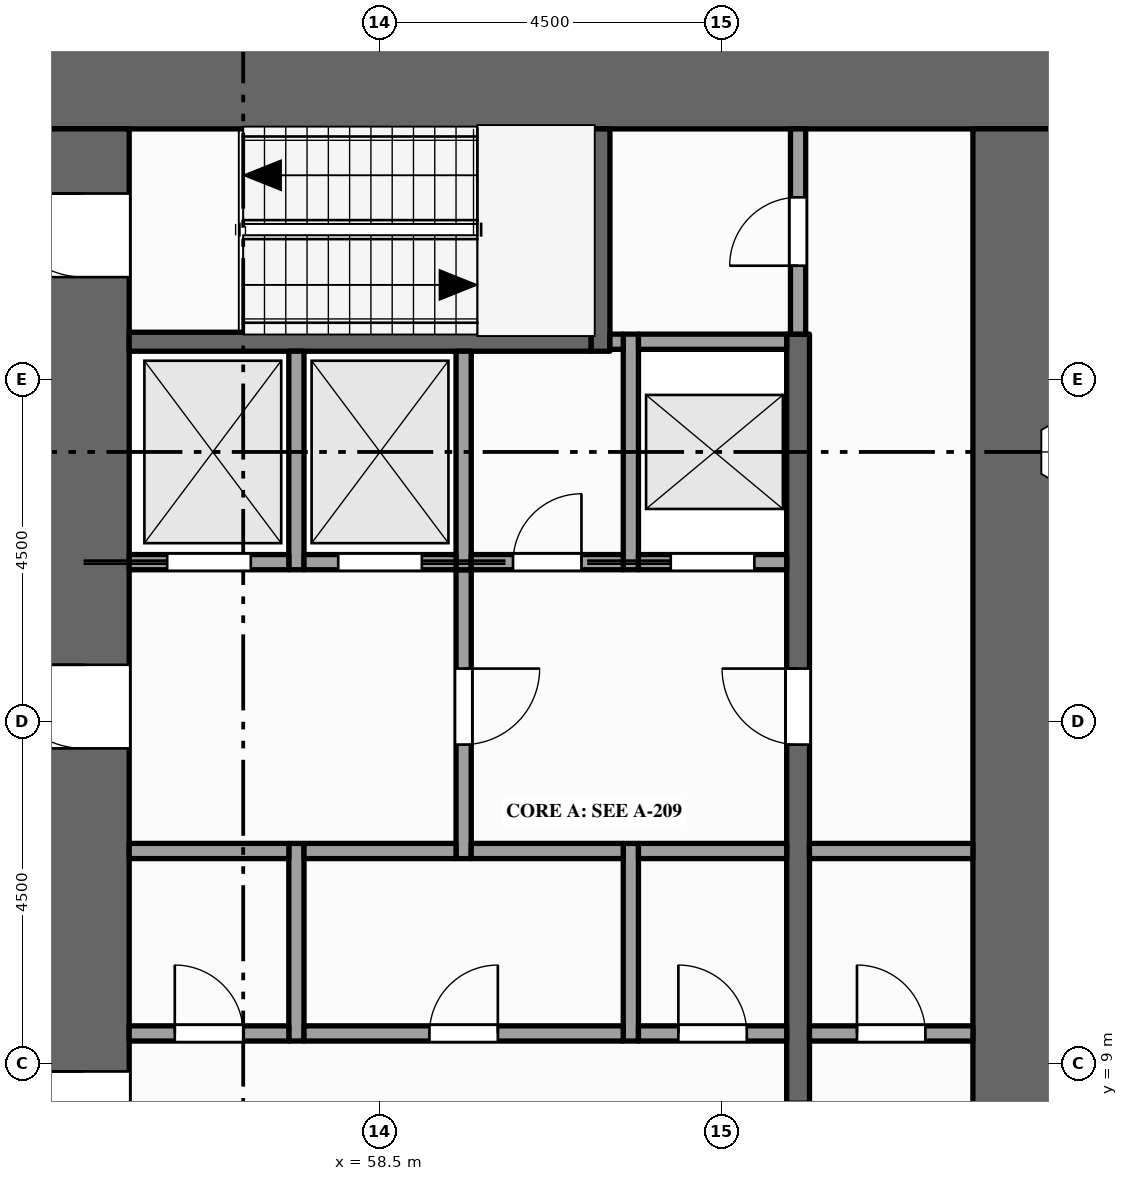
"""IFC4 building model, lengths in metres.
Left out: names, types, materials, properties, quantities, classifications, styles, units other than length and angle.
Written with IfcOpenShell. Run it as: python <this file> out.ifc"""

import sys

from ifc_helpers import new_model, si_unit, direction, frame, frame_2d, origin, place, context, subcontext, project, spatial, rectangle, extrude, element, fill, save


model = new_model("IFC4")
c1 = context("Model", 3, precision=1e-05, world=origin(), true_north=direction((0.0, 1.0)))
c2 = subcontext(c1, "Body", "Model", "MODEL_VIEW")
j1 = project(units=[si_unit("LENGTHUNIT", "METRE"), si_unit("PLANEANGLEUNIT", "RADIAN")], contexts=[c1])
p1 = place(None, origin())
s1 = spatial("IfcSite", under=j1, at=p1, CompositionType="ELEMENT")
p2 = place(p1, origin())
s2 = spatial("IfcBuilding", under=s1, at=p2, CompositionType="ELEMENT")
p3 = place(p2, frame((0.0, 0.0, 45.0)))
s3 = spatial("IfcBuildingStorey", under=s2, at=p3, CompositionType="ELEMENT", Elevation=45.0)
p4 = place(p3, frame((54.0, 21.9, -0.15), z_axis=(0.0, 0.0, 1.0), x_axis=(1.0, 0.0, 0.0)))
e1 = element("IfcWall", 1, at=p4, inside=s3, PredefinedType="SHEAR", context=c2, shape_type="SweptSolid", body=[
    extrude(rectangle(XDim=13.5, YDim=1.2, at=frame_2d((6.75, 0.0))), origin(), (0.0, 0.0, 1.0), 4.0),
])
p5 = place(p3, frame((54.6, 1.2, -0.15), z_axis=(0.0, 0.0, 1.0), x_axis=(0.0, 1.0, 0.0)))
e2 = element("IfcWall", 2, at=p5, inside=s3, PredefinedType="SHEAR", context=c2, shape_type="SweptSolid", body=[
    extrude(rectangle(XDim=20.1, YDim=1.2, at=frame_2d((10.05, 0.0))), origin(), (0.0, 0.0, 1.0), 4.0),
])
p6 = place(p5, frame((5.9, 0.0, 0.15)))
e3 = element("IfcOpeningElement", 3, at=p6, cuts=e2, PredefinedType="OPENING", context=c2, shape_type="SweptSolid", body=[
    extrude(rectangle(XDim=1.8, YDim=2.1, at=frame_2d((0.9, 1.05))), frame((0.0, 0.61, 0.0), z_axis=(0.0, -1.0, 0.0), x_axis=(1.0, 0.0, 0.0)), (0.0, 0.0, 1.0), 1.22),
])
p7 = place(p5, frame((11.95, 0.0, 0.15)))
e4 = element("IfcOpeningElement", 4, at=p7, cuts=e2, PredefinedType="OPENING", context=c2, shape_type="SweptSolid", body=[
    extrude(rectangle(XDim=1.1, YDim=2.1, at=frame_2d((0.55, 1.05))), frame((0.0, 0.61, 0.0), z_axis=(0.0, -1.0, 0.0), x_axis=(1.0, 0.0, 0.0)), (0.0, 0.0, 1.0), 1.22),
])
p8 = place(p5, frame((0.95, 0.0, 0.15)))
e5 = element("IfcOpeningElement", 5, at=p8, cuts=e2, PredefinedType="OPENING", context=c2, shape_type="SweptSolid", body=[
    extrude(rectangle(XDim=1.1, YDim=2.1, at=frame_2d((0.55, 1.05))), frame((0.0, 0.61, 0.0), z_axis=(0.0, -1.0, 0.0), x_axis=(1.0, 0.0, 0.0)), (0.0, 0.0, 1.0), 1.22),
])
p9 = place(p5, frame((18.15, 0.0, 0.15)))
e6 = element("IfcOpeningElement", 6, at=p9, cuts=e2, PredefinedType="OPENING", context=c2, shape_type="SweptSolid", body=[
    extrude(rectangle(XDim=1.1, YDim=2.1, at=frame_2d((0.55, 1.05))), frame((0.0, 0.61, 0.0), z_axis=(0.0, -1.0, 0.0), x_axis=(1.0, 0.0, 0.0)), (0.0, 0.0, 1.0), 1.22),
])
p10 = place(p3, frame((66.9, 1.2, -0.15), z_axis=(0.0, 0.0, 1.0), x_axis=(0.0, 1.0, 0.0)))
e7 = element("IfcWall", 7, at=p10, inside=s3, PredefinedType="SHEAR", context=c2, shape_type="SweptSolid", body=[
    extrude(rectangle(XDim=20.1, YDim=1.2, at=frame_2d((10.05, 0.0))), origin(), (0.0, 0.0, 1.0), 4.0),
])
p11 = place(p3, frame((57.4, 9.3, 0.0), z_axis=(0.0, 0.0, 1.0), x_axis=(0.0, 1.0, 0.0)))
e8 = element("IfcWall", 8, at=p11, inside=s3, PredefinedType="PARTITIONING", context=c2, shape_type="SweptSolid", body=[
    extrude(rectangle(XDim=2.6, YDim=0.2, at=frame_2d((1.3, 0.0))), origin(), (0.0, 0.0, 1.0), 3.85),
])
p12 = place(p3, frame((57.4, 15.5, 0.0), z_axis=(0.0, 0.0, 1.0), x_axis=(0.0, 1.0, 0.0)))
e9 = element("IfcWall", 9, at=p12, inside=s3, PredefinedType="SOLIDWALL", context=c2, shape_type="SweptSolid", body=[
    extrude(rectangle(XDim=2.875, YDim=0.2, at=frame_2d((1.438, 0.0))), origin(), (0.0, 0.0, 1.0), 3.85),
])
p13 = place(p3, frame((59.6, 11.7, 0.0), z_axis=(0.0, 0.0, 1.0), x_axis=(0.0, 1.0, 0.0)))
e10 = element("IfcWall", 10, at=p13, inside=s3, PredefinedType="PARTITIONING", context=c2, shape_type="SweptSolid", body=[
    extrude(rectangle(XDim=3.8, YDim=0.2, at=frame_2d((1.9, 0.0))), origin(), (0.0, 0.0, 1.0), 3.85),
])
p14 = place(p13, frame((1.5, 0.0, 0.0)))
e11 = element("IfcOpeningElement", 11, at=p14, cuts=e10, PredefinedType="OPENING", context=c2, shape_type="SweptSolid", body=[
    extrude(rectangle(XDim=1.0, YDim=2.1, at=frame_2d((0.5, 1.05))), frame((0.0, 0.11, 0.0), z_axis=(0.0, -1.0, 0.0), x_axis=(1.0, 0.0, 0.0)), (0.0, 0.0, 1.0), 0.22),
])
p15 = place(p3, frame((59.6, 15.5, 0.0), z_axis=(0.0, 0.0, 1.0), x_axis=(0.0, 1.0, 0.0)))
e12 = element("IfcWall", 12, at=p15, inside=s3, PredefinedType="SOLIDWALL", context=c2, shape_type="SweptSolid", body=[
    extrude(rectangle(XDim=2.875, YDim=0.2, at=frame_2d((1.438, 0.0))), origin(), (0.0, 0.0, 1.0), 3.85),
])
p16 = place(p3, frame((61.4, 18.375, 0.0), z_axis=(0.0, 0.0, 1.0), x_axis=(0.0, 1.0, 0.0)))
e13 = element("IfcWall", 13, at=p16, inside=s3, PredefinedType="SHEAR", context=c2, shape_type="SweptSolid", body=[
    extrude(rectangle(XDim=2.925, YDim=0.25, at=frame_2d((1.462, 0.0))), origin(), (0.0, 0.0, 1.0), 3.85),
])
p17 = place(p3, frame((61.8, 9.3, 0.0), z_axis=(0.0, 0.0, 1.0), x_axis=(0.0, 1.0, 0.0)))
e14 = element("IfcWall", 14, at=p17, inside=s3, PredefinedType="PARTITIONING", context=c2, shape_type="SweptSolid", body=[
    extrude(rectangle(XDim=2.6, YDim=0.2, at=frame_2d((1.3, 0.0))), origin(), (0.0, 0.0, 1.0), 3.85),
])
p18 = place(p3, frame((61.8, 15.5, 0.0), z_axis=(0.0, 0.0, 1.0), x_axis=(0.0, 1.0, 0.0)))
e15 = element("IfcWall", 15, at=p18, inside=s3, PredefinedType="SOLIDWALL", context=c2, shape_type="SweptSolid", body=[
    extrude(rectangle(XDim=3.1, YDim=0.2, at=frame_2d((1.55, 0.0))), origin(), (0.0, 0.0, 1.0), 3.85),
])
p19 = place(p3, frame((64.0, 4.1, 0.0), z_axis=(0.0, 0.0, 1.0), x_axis=(0.0, 1.0, 0.0)))
e16 = element("IfcWall", 16, at=p19, inside=s3, PredefinedType="SHEAR", context=c2, shape_type="SweptSolid", body=[
    extrude(rectangle(XDim=14.5, YDim=0.3, at=frame_2d((7.25, 0.0))), origin(), (0.0, 0.0, 1.0), 3.85),
])
p20 = place(p19, frame((3.4, 0.0, 0.0)))
e17 = element("IfcOpeningElement", 17, at=p20, cuts=e16, PredefinedType="OPENING", context=c2, shape_type="SweptSolid", body=[
    extrude(rectangle(XDim=1.0, YDim=2.1, at=frame_2d((0.5, 1.05))), frame((0.0, 0.16, 0.0), z_axis=(0.0, -1.0, 0.0), x_axis=(1.0, 0.0, 0.0)), (0.0, 0.0, 1.0), 0.32),
])
p21 = place(p19, frame((9.1, 0.0, 0.0)))
e18 = element("IfcOpeningElement", 18, at=p21, cuts=e16, PredefinedType="OPENING", context=c2, shape_type="SweptSolid", body=[
    extrude(rectangle(XDim=1.0, YDim=2.1, at=frame_2d((0.5, 1.05))), frame((0.0, 0.16, 0.0), z_axis=(0.0, -1.0, 0.0), x_axis=(1.0, 0.0, 0.0)), (0.0, 0.0, 1.0), 0.32),
])
p22 = place(p3, frame((64.0, 18.6, 0.0), z_axis=(0.0, 0.0, 1.0), x_axis=(0.0, 1.0, 0.0)))
e19 = element("IfcWall", 19, at=p22, inside=s3, PredefinedType="PARTITIONING", context=c2, shape_type="SweptSolid", body=[
    extrude(rectangle(XDim=2.7, YDim=0.2, at=frame_2d((1.35, 0.0))), origin(), (0.0, 0.0, 1.0), 3.85),
])
p23 = place(p22, frame((0.9, 0.0, 0.0)))
e20 = element("IfcOpeningElement", 20, at=p23, cuts=e19, PredefinedType="OPENING", context=c2, shape_type="SweptSolid", body=[
    extrude(rectangle(XDim=0.9, YDim=2.1, at=frame_2d((0.45, 1.05))), frame((0.0, 0.11, 0.0), z_axis=(0.0, -1.0, 0.0), x_axis=(1.0, 0.0, 0.0)), (0.0, 0.0, 1.0), 0.22),
])
p24 = place(p3, frame((55.2, 9.4, 0.0), z_axis=(0.0, 0.0, 1.0), x_axis=(1.0, 0.0, 0.0)))
e21 = element("IfcWall", 21, at=p24, inside=s3, PredefinedType="PARTITIONING", context=c2, shape_type="SweptSolid", body=[
    extrude(rectangle(XDim=2.1, YDim=0.2, at=frame_2d((1.05, 0.0))), origin(), (0.0, 0.0, 1.0), 3.85),
])
p25 = place(p24, frame((0.6, 0.0, 0.0)))
e22 = element("IfcOpeningElement", 22, at=p25, cuts=e21, PredefinedType="OPENING", context=c2, shape_type="SweptSolid", body=[
    extrude(rectangle(XDim=0.9, YDim=2.1, at=frame_2d((0.45, 1.05))), frame((0.0, 0.11, 0.0), z_axis=(0.0, -1.0, 0.0), x_axis=(1.0, 0.0, 0.0)), (0.0, 0.0, 1.0), 0.22),
])
p26 = place(p3, frame((57.5, 9.4, 0.0), z_axis=(0.0, 0.0, 1.0), x_axis=(1.0, 0.0, 0.0)))
e23 = element("IfcWall", 23, at=p26, inside=s3, PredefinedType="PARTITIONING", context=c2, shape_type="SweptSolid", body=[
    extrude(rectangle(XDim=4.2, YDim=0.2, at=frame_2d((2.1, 0.0))), origin(), (0.0, 0.0, 1.0), 3.85),
])
p27 = place(p26, frame((1.65, 0.0, 0.0)))
e24 = element("IfcOpeningElement", 24, at=p27, cuts=e23, PredefinedType="OPENING", context=c2, shape_type="SweptSolid", body=[
    extrude(rectangle(XDim=0.9, YDim=2.1, at=frame_2d((0.45, 1.05))), frame((0.0, 0.11, 0.0), z_axis=(0.0, -1.0, 0.0), x_axis=(1.0, 0.0, 0.0)), (0.0, 0.0, 1.0), 0.22),
])
p28 = place(p3, frame((61.9, 9.4, 0.0), z_axis=(0.0, 0.0, 1.0), x_axis=(1.0, 0.0, 0.0)))
e25 = element("IfcWall", 25, at=p28, inside=s3, PredefinedType="PARTITIONING", context=c2, shape_type="SweptSolid", body=[
    extrude(rectangle(XDim=1.95, YDim=0.2, at=frame_2d((0.975, 0.0))), origin(), (0.0, 0.0, 1.0), 3.85),
])
p29 = place(p28, frame((0.525, 0.0, 0.0)))
e26 = element("IfcOpeningElement", 26, at=p29, cuts=e25, PredefinedType="OPENING", context=c2, shape_type="SweptSolid", body=[
    extrude(rectangle(XDim=0.9, YDim=2.1, at=frame_2d((0.45, 1.05))), frame((0.0, 0.11, 0.0), z_axis=(0.0, -1.0, 0.0), x_axis=(1.0, 0.0, 0.0)), (0.0, 0.0, 1.0), 0.22),
])
p30 = place(p3, frame((64.15, 9.4, 0.0), z_axis=(0.0, 0.0, 1.0), x_axis=(1.0, 0.0, 0.0)))
e27 = element("IfcWall", 27, at=p30, inside=s3, PredefinedType="PARTITIONING", context=c2, shape_type="SweptSolid", body=[
    extrude(rectangle(XDim=2.15, YDim=0.2, at=frame_2d((1.075, 0.0))), origin(), (0.0, 0.0, 1.0), 3.85),
])
p31 = place(p30, frame((0.625, 0.0, 0.0)))
e28 = element("IfcOpeningElement", 28, at=p31, cuts=e27, PredefinedType="OPENING", context=c2, shape_type="SweptSolid", body=[
    extrude(rectangle(XDim=0.9, YDim=2.1, at=frame_2d((0.45, 1.05))), frame((0.0, 0.11, 0.0), z_axis=(0.0, -1.0, 0.0), x_axis=(1.0, 0.0, 0.0)), (0.0, 0.0, 1.0), 0.22),
])
p32 = place(p3, frame((55.2, 11.8, 0.0), z_axis=(0.0, 0.0, 1.0), x_axis=(1.0, 0.0, 0.0)))
e29 = element("IfcWall", 29, at=p32, inside=s3, PredefinedType="PARTITIONING", context=c2, shape_type="SweptSolid", body=[
    extrude(rectangle(XDim=2.1, YDim=0.2, at=frame_2d((1.05, 0.0))), origin(), (0.0, 0.0, 1.0), 3.85),
])
for number, where, z_axis, x_axis in (
    (30, (57.5, 11.8, 0.0), (0.0, 0.0, 1.0), (1.0, 0.0, 0.0)),
    (31, (59.7, 11.8, 0.0), (0.0, 0.0, 1.0), (1.0, 0.0, 0.0)),
):
    element("IfcWall", number, at=place(p3, frame(where, z_axis=z_axis, x_axis=x_axis)), inside=s3, PredefinedType="PARTITIONING", context=c2, shape_type="SweptSolid", body=[
        extrude(rectangle(XDim=2.0, YDim=0.2, at=frame_2d((1.0, 0.0))), origin(), (0.0, 0.0, 1.0), 3.85),
    ])
p33 = place(p3, frame((61.9, 11.8, 0.0), z_axis=(0.0, 0.0, 1.0), x_axis=(1.0, 0.0, 0.0)))
e32 = element("IfcWall", 32, at=p33, inside=s3, PredefinedType="PARTITIONING", context=c2, shape_type="SweptSolid", body=[
    extrude(rectangle(XDim=1.95, YDim=0.2, at=frame_2d((0.975, 0.0))), origin(), (0.0, 0.0, 1.0), 3.85),
])
p34 = place(p3, frame((64.15, 11.8, 0.0), z_axis=(0.0, 0.0, 1.0), x_axis=(1.0, 0.0, 0.0)))
e33 = element("IfcWall", 33, at=p34, inside=s3, PredefinedType="PARTITIONING", context=c2, shape_type="SweptSolid", body=[
    extrude(rectangle(XDim=2.15, YDim=0.2, at=frame_2d((1.075, 0.0))), origin(), (0.0, 0.0, 1.0), 3.85),
])
p35 = place(p3, frame((55.2, 15.6, 0.0), z_axis=(0.0, 0.0, 1.0), x_axis=(1.0, 0.0, 0.0)))
e34 = element("IfcWall", 34, at=p35, inside=s3, PredefinedType="SOLIDWALL", context=c2, shape_type="SweptSolid", body=[
    extrude(rectangle(XDim=2.1, YDim=0.2, at=frame_2d((1.05, 0.0))), origin(), (0.0, 0.0, 1.0), 3.85),
])
p36 = place(p35, frame((0.5, 0.0, 0.012)))
e35 = element("IfcOpeningElement", 35, at=p36, cuts=e34, PredefinedType="OPENING", context=c2, shape_type="SweptSolid", body=[
    extrude(rectangle(XDim=1.1, YDim=2.1, at=frame_2d((0.55, 1.05))), frame((0.0, 0.11, 0.0), z_axis=(0.0, -1.0, 0.0), x_axis=(1.0, 0.0, 0.0)), (0.0, 0.0, 1.0), 0.22),
])
p37 = place(p3, frame((57.5, 15.6, 0.0), z_axis=(0.0, 0.0, 1.0), x_axis=(1.0, 0.0, 0.0)))
e36 = element("IfcWall", 36, at=p37, inside=s3, PredefinedType="SOLIDWALL", context=c2, shape_type="SweptSolid", body=[
    extrude(rectangle(XDim=2.0, YDim=0.2, at=frame_2d((1.0, 0.0))), origin(), (0.0, 0.0, 1.0), 3.85),
])
p38 = place(p37, frame((0.45, 0.0, 0.012)))
e37 = element("IfcOpeningElement", 37, at=p38, cuts=e36, PredefinedType="OPENING", context=c2, shape_type="SweptSolid", body=[
    extrude(rectangle(XDim=1.1, YDim=2.1, at=frame_2d((0.55, 1.05))), frame((0.0, 0.11, 0.0), z_axis=(0.0, -1.0, 0.0), x_axis=(1.0, 0.0, 0.0)), (0.0, 0.0, 1.0), 0.22),
])
p39 = place(p3, frame((59.7, 15.6, 0.0), z_axis=(0.0, 0.0, 1.0), x_axis=(1.0, 0.0, 0.0)))
e38 = element("IfcWall", 38, at=p39, inside=s3, PredefinedType="PARTITIONING", context=c2, shape_type="SweptSolid", body=[
    extrude(rectangle(XDim=2.0, YDim=0.2, at=frame_2d((1.0, 0.0))), origin(), (0.0, 0.0, 1.0), 3.85),
])
p40 = place(p39, frame((0.55, 0.0, 0.0)))
e39 = element("IfcOpeningElement", 39, at=p40, cuts=e38, PredefinedType="OPENING", context=c2, shape_type="SweptSolid", body=[
    extrude(rectangle(XDim=0.9, YDim=2.1, at=frame_2d((0.45, 1.05))), frame((0.0, 0.11, 0.0), z_axis=(0.0, -1.0, 0.0), x_axis=(1.0, 0.0, 0.0)), (0.0, 0.0, 1.0), 0.22),
])
p41 = place(p3, frame((61.9, 15.6, 0.0), z_axis=(0.0, 0.0, 1.0), x_axis=(1.0, 0.0, 0.0)))
e40 = element("IfcWall", 40, at=p41, inside=s3, PredefinedType="SOLIDWALL", context=c2, shape_type="SweptSolid", body=[
    extrude(rectangle(XDim=1.95, YDim=0.2, at=frame_2d((0.975, 0.0))), origin(), (0.0, 0.0, 1.0), 3.85),
])
p42 = place(p41, frame((0.425, 0.0, 0.012)))
e41 = element("IfcOpeningElement", 41, at=p42, cuts=e40, PredefinedType="OPENING", context=c2, shape_type="SweptSolid", body=[
    extrude(rectangle(XDim=1.1, YDim=2.1, at=frame_2d((0.55, 1.05))), frame((0.0, 0.11, 0.0), z_axis=(0.0, -1.0, 0.0), x_axis=(1.0, 0.0, 0.0)), (0.0, 0.0, 1.0), 0.22),
])
p43 = place(p3, frame((55.2, 18.5, 0.0), z_axis=(0.0, 0.0, 1.0), x_axis=(1.0, 0.0, 0.0)))
e42 = element("IfcWall", 42, at=p43, inside=s3, PredefinedType="SHEAR", context=c2, shape_type="SweptSolid", body=[
    extrude(rectangle(XDim=6.075, YDim=0.25, at=frame_2d((3.038, 0.0))), origin(), (0.0, 0.0, 1.0), 3.85),
])
p44 = place(p3, frame((61.525, 18.5, 0.0), z_axis=(0.0, 0.0, 1.0), x_axis=(1.0, 0.0, 0.0)))
e43 = element("IfcWall", 43, at=p44, inside=s3, PredefinedType="PARTITIONING", context=c2, shape_type="SweptSolid", body=[
    extrude(rectangle(XDim=0.175, YDim=0.2, at=frame_2d((0.087, 0.0))), origin(), (0.0, 0.0, 1.0), 3.85),
])
p45 = place(p3, frame((61.9, 18.5, 0.0), z_axis=(0.0, 0.0, 1.0), x_axis=(1.0, 0.0, 0.0)))
e44 = element("IfcWall", 44, at=p45, inside=s3, PredefinedType="SOLIDWALL", context=c2, shape_type="SweptSolid", body=[
    extrude(rectangle(XDim=1.95, YDim=0.2, at=frame_2d((0.975, 0.0))), origin(), (0.0, 0.0, 1.0), 3.85),
])
p46 = place(p36, origin())
e45 = element("IfcDoor", 45, at=p46, inside=s3, OperationType="SLIDING_TO_LEFT", PredefinedType="DOOR", context=c2, shape_type="SweptSolid", body=[
    extrude(rectangle(XDim=1.1, YDim=2.1, at=frame_2d((0.55, 1.05))), frame((0.0, 0.025, 0.0), z_axis=(0.0, -1.0, 0.0), x_axis=(1.0, 0.0, 0.0)), (0.0, 0.0, 1.0), 0.05),
])
fill(e35, e45)
p47 = place(p38, origin())
e46 = element("IfcDoor", 46, at=p47, inside=s3, OperationType="SLIDING_TO_RIGHT", PredefinedType="DOOR", context=c2, shape_type="SweptSolid", body=[
    extrude(rectangle(XDim=1.1, YDim=2.1, at=frame_2d((0.55, 1.05))), frame((0.0, 0.025, 0.0), z_axis=(0.0, -1.0, 0.0), x_axis=(1.0, 0.0, 0.0)), (0.0, 0.0, 1.0), 0.05),
])
fill(e37, e46)
p48 = place(p42, origin())
e47 = element("IfcDoor", 47, at=p48, inside=s3, OperationType="SLIDING_TO_LEFT", PredefinedType="DOOR", context=c2, shape_type="SweptSolid", body=[
    extrude(rectangle(XDim=1.1, YDim=2.1, at=frame_2d((0.55, 1.05))), frame((0.0, 0.025, 0.0), z_axis=(0.0, -1.0, 0.0), x_axis=(1.0, 0.0, 0.0)), (0.0, 0.0, 1.0), 0.05),
])
fill(e41, e47)
p49 = place(p6, origin())
e48 = element("IfcDoor", 48, at=p49, inside=s3, OperationType="DOUBLE_DOOR_SINGLE_SWING", PredefinedType="DOOR", context=c2, shape_type="SweptSolid", body=[
    extrude(rectangle(XDim=1.8, YDim=2.1, at=frame_2d((0.9, 1.05))), frame((0.0, 0.025, 0.0), z_axis=(0.0, -1.0, 0.0), x_axis=(1.0, 0.0, 0.0)), (0.0, 0.0, 1.0), 0.05),
])
fill(e3, e48)
p50 = place(p7, origin())
e49 = element("IfcDoor", 49, at=p50, inside=s3, OperationType="SINGLE_SWING_RIGHT", PredefinedType="DOOR", context=c2, shape_type="SweptSolid", body=[
    extrude(rectangle(XDim=1.1, YDim=2.1, at=frame_2d((0.55, 1.05))), frame((0.0, 0.025, 0.0), z_axis=(0.0, -1.0, 0.0), x_axis=(1.0, 0.0, 0.0)), (0.0, 0.0, 1.0), 0.05),
])
fill(e4, e49)
p51 = place(p14, origin())
e50 = element("IfcDoor", 50, at=p51, inside=s3, OperationType="SINGLE_SWING_RIGHT", PredefinedType="DOOR", context=c2, shape_type="SweptSolid", body=[
    extrude(rectangle(XDim=1.0, YDim=2.1, at=frame_2d((0.5, 1.05))), frame((0.0, 0.025, 0.0), z_axis=(0.0, -1.0, 0.0), x_axis=(1.0, 0.0, 0.0)), (0.0, 0.0, 1.0), 0.05),
])
fill(e11, e50)
p52 = place(p21, origin())
e51 = element("IfcDoor", 51, at=p52, inside=s3, OperationType="SINGLE_SWING_RIGHT", PredefinedType="DOOR", context=c2, shape_type="SweptSolid", body=[
    extrude(rectangle(XDim=1.0, YDim=2.1, at=frame_2d((0.5, 1.05))), frame((0.0, 0.025, 0.0), z_axis=(0.0, -1.0, 0.0), x_axis=(1.0, 0.0, 0.0)), (0.0, 0.0, 1.0), 0.05),
])
fill(e18, e51)
p53 = place(p31, origin())
e52 = element("IfcDoor", 52, at=p53, inside=s3, OperationType="SINGLE_SWING_LEFT", PredefinedType="DOOR", context=c2, shape_type="SweptSolid", body=[
    extrude(rectangle(XDim=0.9, YDim=2.1, at=frame_2d((0.45, 1.05))), frame((0.0, 0.025, 0.0), z_axis=(0.0, -1.0, 0.0), x_axis=(1.0, 0.0, 0.0)), (0.0, 0.0, 1.0), 0.05),
])
fill(e28, e52)
p54 = place(p9, origin())
e53 = element("IfcDoor", 53, at=p54, inside=s3, OperationType="SINGLE_SWING_RIGHT", PredefinedType="DOOR", context=c2, shape_type="SweptSolid", body=[
    extrude(rectangle(XDim=1.1, YDim=2.1, at=frame_2d((0.55, 1.05))), frame((0.0, 0.025, 0.0), z_axis=(0.0, -1.0, 0.0), x_axis=(1.0, 0.0, 0.0)), (0.0, 0.0, 1.0), 0.05),
])
fill(e6, e53)
p55 = place(p23, origin())
e54 = element("IfcDoor", 54, at=p55, inside=s3, OperationType="SINGLE_SWING_LEFT", PredefinedType="DOOR", context=c2, shape_type="SweptSolid", body=[
    extrude(rectangle(XDim=0.9, YDim=2.1, at=frame_2d((0.45, 1.05))), frame((0.0, 0.025, 0.0), z_axis=(0.0, -1.0, 0.0), x_axis=(1.0, 0.0, 0.0)), (0.0, 0.0, 1.0), 0.05),
])
fill(e20, e54)
p56 = place(p25, origin())
e55 = element("IfcDoor", 55, at=p56, inside=s3, OperationType="SINGLE_SWING_LEFT", PredefinedType="DOOR", context=c2, shape_type="SweptSolid", body=[
    extrude(rectangle(XDim=0.9, YDim=2.1, at=frame_2d((0.45, 1.05))), frame((0.0, 0.025, 0.0), z_axis=(0.0, -1.0, 0.0), x_axis=(1.0, 0.0, 0.0)), (0.0, 0.0, 1.0), 0.05),
])
fill(e22, e55)
p57 = place(p27, origin())
e56 = element("IfcDoor", 56, at=p57, inside=s3, OperationType="SINGLE_SWING_RIGHT", PredefinedType="DOOR", context=c2, shape_type="SweptSolid", body=[
    extrude(rectangle(XDim=0.9, YDim=2.1, at=frame_2d((0.45, 1.05))), frame((0.0, 0.025, 0.0), z_axis=(0.0, -1.0, 0.0), x_axis=(1.0, 0.0, 0.0)), (0.0, 0.0, 1.0), 0.05),
])
fill(e24, e56)
p58 = place(p29, origin())
e57 = element("IfcDoor", 57, at=p58, inside=s3, OperationType="SINGLE_SWING_LEFT", PredefinedType="DOOR", context=c2, shape_type="SweptSolid", body=[
    extrude(rectangle(XDim=0.9, YDim=2.1, at=frame_2d((0.45, 1.05))), frame((0.0, 0.025, 0.0), z_axis=(0.0, -1.0, 0.0), x_axis=(1.0, 0.0, 0.0)), (0.0, 0.0, 1.0), 0.05),
])
fill(e26, e57)
p59 = place(p40, origin())
e58 = element("IfcDoor", 58, at=p59, inside=s3, OperationType="SINGLE_SWING_RIGHT", PredefinedType="DOOR", context=c2, shape_type="SweptSolid", body=[
    extrude(rectangle(XDim=0.9, YDim=2.1, at=frame_2d((0.45, 1.05))), frame((0.0, 0.025, 0.0), z_axis=(0.0, -1.0, 0.0), x_axis=(1.0, 0.0, 0.0)), (0.0, 0.0, 1.0), 0.05),
])
fill(e39, e58)
save(model, sys.argv[1])
